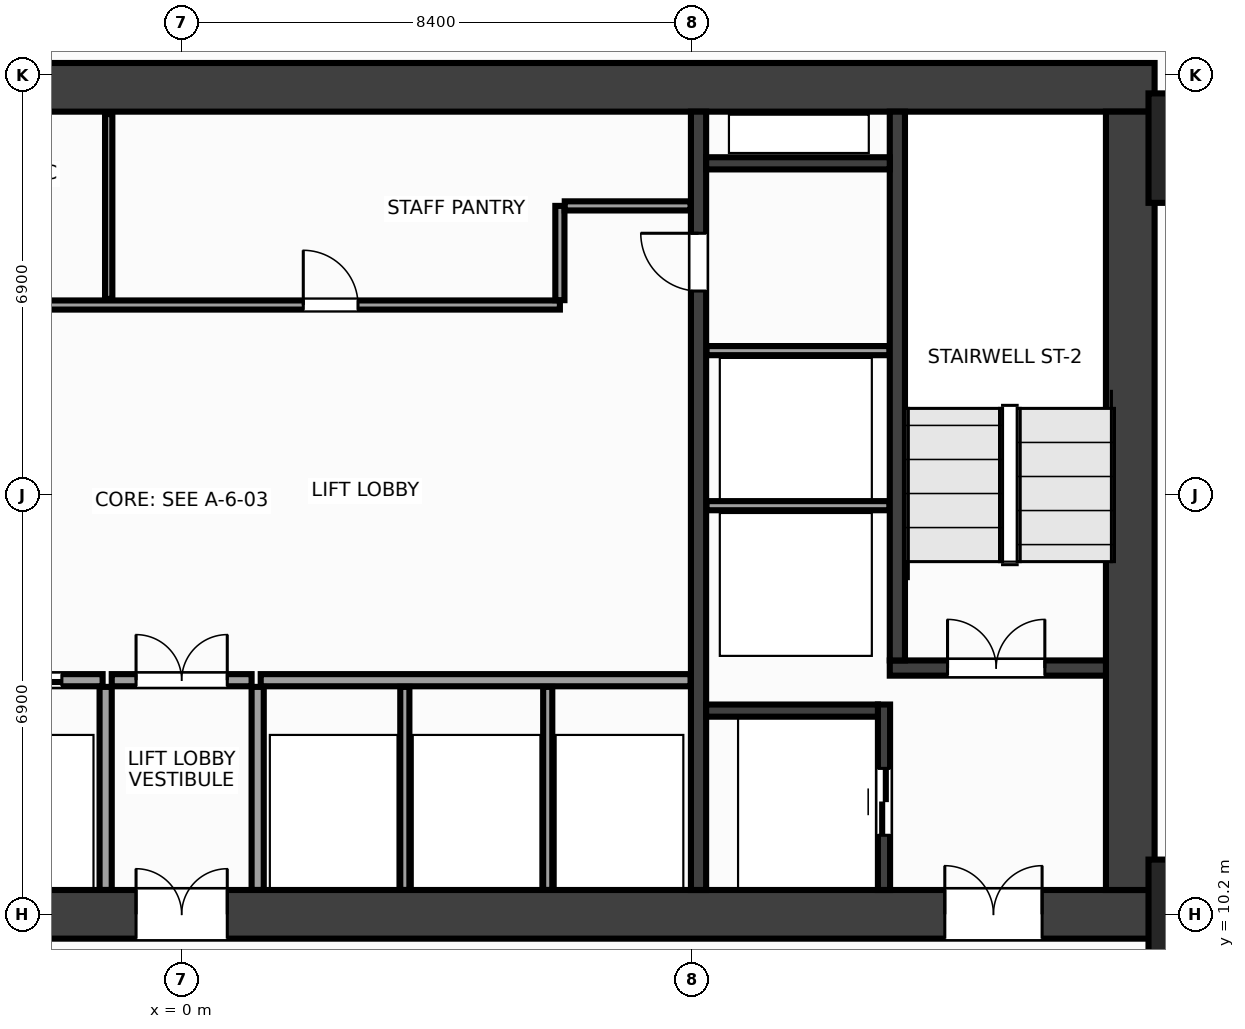
"""IFC4 building model, lengths in metres.
Left out: names, types, materials, properties, quantities, classifications, styles, units other than length and angle.
Written with IfcOpenShell. Run it as: python <this file> out.ifc"""

import sys

from ifc_helpers import new_model, si_unit, direction, frame, frame_2d, origin, origin_2d, place, context, subcontext, project, spatial, rectangle, extrude, source, transform, mapped, element, fill, save


model = new_model("IFC4")
c1 = context("Model", 3, precision=1e-05, world=origin(), true_north=direction((0.0, 1.0)))
c2 = subcontext(c1, "Body", "Model", "MODEL_VIEW")
j1 = project(units=[si_unit("LENGTHUNIT", "METRE"), si_unit("PLANEANGLEUNIT", "RADIAN")], contexts=[c1])
p1 = place(None, origin())
s1 = spatial("IfcSite", under=j1, at=p1, CompositionType="ELEMENT")
p2 = place(p1, origin())
s2 = spatial("IfcBuilding", under=s1, at=p2, CompositionType="ELEMENT")
p3 = place(p2, frame((0.0, 0.0, 23.6)))
s3 = spatial("IfcBuildingStorey", under=s2, at=p3, CompositionType="ELEMENT", Elevation=23.6)
m1 = source(origin(), c2, "Body", "SweptSolid", [
    extrude(rectangle(XDim=32.0, YDim=0.8, at=frame_2d((16.0, 0.0))), origin(), (0.0, 0.0, 1.0), 3.6),
])
p4 = place(p3, frame((-16.0, 23.8, 0.0), z_axis=(0.0, 0.0, 1.0), x_axis=(1.0, 0.0, 0.0)))
e1 = element("IfcWall", 1, at=p4, inside=s3, PredefinedType="SHEAR", context=c2, shape_type="MappedRepresentation", body=[
    mapped(m1, transform((0.0, 0.0, 0.0), x_axis=(1.0, 0.0, 0.0), y_axis=(0.0, 1.0, 0.0), z_axis=(0.0, 0.0, 1.0), scale=1.0)),
])
p5 = place(p3, frame((-16.0, 10.2, 0.0), z_axis=(0.0, 0.0, 1.0), x_axis=(1.0, 0.0, 0.0)))
e2 = element("IfcWall", 2, at=p5, inside=s3, PredefinedType="SHEAR", context=c2, shape_type="MappedRepresentation", body=[
    mapped(m1, transform((0.0, 0.0, 0.0), x_axis=(1.0, 0.0, 0.0), y_axis=(0.0, 1.0, 0.0), z_axis=(0.0, 0.0, 1.0), scale=1.0)),
])
p6 = place(p5, frame((1.85, 0.0, 0.0)))
e3 = element("IfcOpeningElement", 3, at=p6, cuts=e2, PredefinedType="OPENING", context=c2, shape_type="SweptSolid", body=[
    extrude(rectangle(XDim=1.6, YDim=2.15, at=frame_2d((0.8, 1.075))), frame((0.0, 0.412, 0.0), z_axis=(0.0, -1.0, 0.0), x_axis=(1.0, 0.0, 0.0)), (0.0, 0.0, 1.0), 0.824),
])
p7 = place(p5, frame((28.55, 0.0, 0.0)))
e4 = element("IfcOpeningElement", 4, at=p7, cuts=e2, PredefinedType="OPENING", context=c2, shape_type="SweptSolid", body=[
    extrude(rectangle(XDim=1.6, YDim=2.15, at=frame_2d((0.8, 1.075))), frame((0.0, 0.412, 0.0), z_axis=(0.0, -1.0, 0.0), x_axis=(1.0, 0.0, 0.0)), (0.0, 0.0, 1.0), 0.824),
])
p8 = place(p5, frame((15.25, 0.0, 0.0)))
e5 = element("IfcOpeningElement", 5, at=p8, cuts=e2, PredefinedType="OPENING", context=c2, shape_type="SweptSolid", body=[
    extrude(rectangle(XDim=1.5, YDim=2.2, at=frame_2d((0.75, 1.1))), frame((0.0, 0.412, 0.0), z_axis=(0.0, -1.0, 0.0), x_axis=(1.0, 0.0, 0.0)), (0.0, 0.0, 1.0), 0.824),
])
m2 = source(origin(), c2, "Body", "SweptSolid", [
    extrude(rectangle(XDim=12.8, YDim=0.8, at=frame_2d((6.4, 0.0))), origin(), (0.0, 0.0, 1.0), 3.6),
])
p9 = place(p3, frame((15.6, 10.6, 0.0), z_axis=(0.0, 0.0, 1.0), x_axis=(0.0, 1.0, 0.0)))
e6 = element("IfcWall", 6, at=p9, inside=s3, PredefinedType="SHEAR", context=c2, shape_type="MappedRepresentation", body=[
    mapped(m2, transform((0.0, 0.0, 0.0), x_axis=(1.0, 0.0, 0.0), y_axis=(0.0, 1.0, 0.0), z_axis=(0.0, 0.0, 1.0), scale=1.0)),
])
m3 = source(origin(), c2, "Body", "SweptSolid", [
    extrude(rectangle(XDim=12.8, YDim=0.25, at=frame_2d((6.4, 0.0))), origin(), (0.0, 0.0, 1.0), 3.6),
])
p10 = place(p3, frame((8.5, 10.6, 0.0), z_axis=(0.0, 0.0, 1.0), x_axis=(0.0, 1.0, 0.0)))
e7 = element("IfcWall", 7, at=p10, inside=s3, PredefinedType="SHEAR", context=c2, shape_type="MappedRepresentation", body=[
    mapped(m3, transform((0.0, 0.0, 0.0), x_axis=(1.0, 0.0, 0.0), y_axis=(0.0, 1.0, 0.0), z_axis=(0.0, 0.0, 1.0), scale=1.0)),
])
p11 = place(p10, frame((9.85, 0.0, 0.0)))
e8 = element("IfcOpeningElement", 8, at=p11, cuts=e7, PredefinedType="OPENING", context=c2, shape_type="SweptSolid", body=[
    extrude(rectangle(XDim=0.95, YDim=2.15, at=frame_2d((0.475, 1.075))), frame((0.0, 0.137, 0.0), z_axis=(0.0, -1.0, 0.0), x_axis=(1.0, 0.0, 0.0)), (0.0, 0.0, 1.0), 0.274),
])
m4 = source(origin(), c2, "Body", "SweptSolid", [
    extrude(rectangle(XDim=3.555, YDim=0.25, at=frame_2d((1.777, 0.0))), origin(), (0.0, 0.0, 1.0), 3.6),
])
p12 = place(p3, frame((11.645, 14.25, 0.0), z_axis=(0.0, 0.0, 1.0), x_axis=(1.0, 0.0, 0.0)))
e9 = element("IfcWall", 9, at=p12, inside=s3, PredefinedType="SHEAR", context=c2, shape_type="MappedRepresentation", body=[
    mapped(m4, transform((0.0, 0.0, 0.0), x_axis=(1.0, 0.0, 0.0), y_axis=(0.0, 1.0, 0.0), z_axis=(0.0, 0.0, 1.0), scale=1.0)),
])
p13 = place(p12, frame((0.95, 0.0, 0.0)))
e10 = element("IfcOpeningElement", 10, at=p13, cuts=e9, PredefinedType="OPENING", context=c2, shape_type="SweptSolid", body=[
    extrude(rectangle(XDim=1.6, YDim=2.15, at=frame_2d((0.8, 1.075))), frame((0.0, 0.137, 0.0), z_axis=(0.0, -1.0, 0.0), x_axis=(1.0, 0.0, 0.0)), (0.0, 0.0, 1.0), 0.274),
])
m5 = source(origin(), c2, "Body", "SweptSolid", [
    extrude(rectangle(XDim=9.025, YDim=0.25, at=frame_2d((4.512, 0.0))), origin(), (0.0, 0.0, 1.0), 3.6),
])
p14 = place(p3, frame((11.77, 14.375, 0.0), z_axis=(0.0, 0.0, 1.0), x_axis=(0.0, 1.0, 0.0)))
e11 = element("IfcWall", 11, at=p14, inside=s3, PredefinedType="SHEAR", context=c2, shape_type="MappedRepresentation", body=[
    mapped(m5, transform((0.0, 0.0, 0.0), x_axis=(1.0, 0.0, 0.0), y_axis=(0.0, 1.0, 0.0), z_axis=(0.0, 0.0, 1.0), scale=1.0)),
])
m6 = source(origin(), c2, "Body", "SweptSolid", [
    extrude(rectangle(XDim=3.05, YDim=0.2, at=frame_2d((1.525, 0.0))), origin(), (0.0, 0.0, 1.0), 3.6),
])
p15 = place(p3, frame((11.55, 10.6, 0.0), z_axis=(0.0, 0.0, 1.0), x_axis=(0.0, 1.0, 0.0)))
e12 = element("IfcWall", 12, at=p15, inside=s3, PredefinedType="SHEAR", context=c2, shape_type="MappedRepresentation", body=[
    mapped(m6, transform((0.0, 0.0, 0.0), x_axis=(1.0, 0.0, 0.0), y_axis=(0.0, 1.0, 0.0), z_axis=(0.0, 0.0, 1.0), scale=1.0)),
])
p16 = place(p15, frame((0.9, 0.0, 0.0)))
e13 = element("IfcOpeningElement", 13, at=p16, cuts=e12, PredefinedType="OPENING", context=c2, shape_type="SweptSolid", body=[
    extrude(rectangle(XDim=1.1, YDim=2.15, at=frame_2d((0.55, 1.075))), frame((0.0, 0.112, 0.0), z_axis=(0.0, -1.0, 0.0), x_axis=(1.0, 0.0, 0.0)), (0.0, 0.0, 1.0), 0.224),
])
m7 = source(origin(), c2, "Body", "SweptSolid", [
    extrude(rectangle(XDim=2.825, YDim=0.2, at=frame_2d((1.413, 0.0))), origin(), (0.0, 0.0, 1.0), 3.6),
])
p17 = place(p3, frame((8.625, 13.55, 0.0), z_axis=(0.0, 0.0, 1.0), x_axis=(1.0, 0.0, 0.0)))
e14 = element("IfcWall", 14, at=p17, inside=s3, PredefinedType="SHEAR", context=c2, shape_type="MappedRepresentation", body=[
    mapped(m7, transform((0.0, 0.0, 0.0), x_axis=(1.0, 0.0, 0.0), y_axis=(0.0, 1.0, 0.0), z_axis=(0.0, 0.0, 1.0), scale=1.0)),
])
m8 = source(origin(), c2, "Body", "SweptSolid", [
    extrude(rectangle(XDim=3.02, YDim=0.2, at=frame_2d((1.51, 0.0))), origin(), (0.0, 0.0, 1.0), 3.6),
])
p18 = place(p3, frame((8.625, 22.55, 0.0), z_axis=(0.0, 0.0, 1.0), x_axis=(1.0, 0.0, 0.0)))
e15 = element("IfcWall", 15, at=p18, inside=s3, PredefinedType="SHEAR", context=c2, shape_type="MappedRepresentation", body=[
    mapped(m8, transform((0.0, 0.0, 0.0), x_axis=(1.0, 0.0, 0.0), y_axis=(0.0, 1.0, 0.0), z_axis=(0.0, 0.0, 1.0), scale=1.0)),
])
m9 = source(origin(), c2, "Body", "SweptSolid", [
    extrude(rectangle(XDim=1.8, YDim=1.8, at=origin_2d()), origin(), (0.0, 0.0, 1.0), 3.6),
])
for number, where, z_axis, x_axis in (
    (16, (16.8, 10.2, 0.0), (0.0, 0.0, 1.0), (1.0, 0.0, 0.0)),
    (17, (16.8, 22.8, 0.0), (0.0, 0.0, 1.0), (1.0, 0.0, 0.0)),
):
    element("IfcColumn", number, at=place(p3, frame(where, z_axis=z_axis, x_axis=x_axis)), inside=s3, PredefinedType="COLUMN", context=c2, shape_type="MappedRepresentation", body=[
        mapped(m9, transform((0.0, 0.0, 0.0), x_axis=(1.0, 0.0, 0.0), y_axis=(0.0, 1.0, 0.0), z_axis=(0.0, 0.0, 1.0), scale=1.0)),
    ])
m10 = source(origin(), c2, "Body", "SweptSolid", [
    extrude(rectangle(XDim=3.01, YDim=0.15, at=frame_2d((1.505, 0.0))), origin(), (0.0, 0.0, 1.0), 3.36),
])
for number, where, z_axis, x_axis in (
    (18, (8.63, 16.92, 0.0), (0.0, 0.0, 1.0), (1.0, 0.0, 0.0)),
    (19, (8.63, 19.47, 0.0), (0.0, 0.0, 1.0), (1.0, 0.0, 0.0)),
):
    element("IfcWall", number, at=place(p3, frame(where, z_axis=z_axis, x_axis=x_axis)), inside=s3, PredefinedType="PARTITIONING", context=c2, shape_type="MappedRepresentation", body=[
        mapped(m10, transform((0.0, 0.0, 0.0), x_axis=(1.0, 0.0, 0.0), y_axis=(0.0, 1.0, 0.0), z_axis=(0.0, 0.0, 1.0), scale=1.0)),
    ])
m11 = source(origin(), c2, "Body", "SweptSolid", [
    extrude(rectangle(XDim=7.07, YDim=0.2, at=frame_2d((3.535, 0.0))), origin(), (0.0, 0.0, 1.0), 3.36),
])
p19 = place(p3, frame((-8.37, 14.05, 0.0), z_axis=(0.0, 0.0, 1.0), x_axis=(1.0, 0.0, 0.0)))
e20 = element("IfcWall", 20, at=p19, inside=s3, PredefinedType="PARTITIONING", context=c2, shape_type="MappedRepresentation", body=[
    mapped(m11, transform((0.0, 0.0, 0.0), x_axis=(1.0, 0.0, 0.0), y_axis=(0.0, 1.0, 0.0), z_axis=(0.0, 0.0, 1.0), scale=1.0)),
])
p20 = place(p19, frame((0.6, 0.0, 0.0)))
e21 = element("IfcOpeningElement", 21, at=p20, cuts=e20, PredefinedType="OPENING", context=c2, shape_type="SweptSolid", body=[
    extrude(rectangle(XDim=1.1, YDim=2.15, at=frame_2d((0.55, 1.075))), frame((0.0, 0.112, 0.0), z_axis=(0.0, -1.0, 0.0), x_axis=(1.0, 0.0, 0.0)), (0.0, 0.0, 1.0), 0.224),
])
p21 = place(p19, frame((2.95, 0.0, 0.0)))
e22 = element("IfcOpeningElement", 22, at=p21, cuts=e20, PredefinedType="OPENING", context=c2, shape_type="SweptSolid", body=[
    extrude(rectangle(XDim=1.1, YDim=2.15, at=frame_2d((0.55, 1.075))), frame((0.0, 0.112, 0.0), z_axis=(0.0, -1.0, 0.0), x_axis=(1.0, 0.0, 0.0)), (0.0, 0.0, 1.0), 0.224),
])
p22 = place(p19, frame((5.3, 0.0, 0.0)))
e23 = element("IfcOpeningElement", 23, at=p22, cuts=e20, PredefinedType="OPENING", context=c2, shape_type="SweptSolid", body=[
    extrude(rectangle(XDim=1.1, YDim=2.15, at=frame_2d((0.55, 1.075))), frame((0.0, 0.112, 0.0), z_axis=(0.0, -1.0, 0.0), x_axis=(1.0, 0.0, 0.0)), (0.0, 0.0, 1.0), 0.224),
])
p23 = place(p3, frame((1.3, 14.05, 0.0), z_axis=(0.0, 0.0, 1.0), x_axis=(1.0, 0.0, 0.0)))
e24 = element("IfcWall", 24, at=p23, inside=s3, PredefinedType="PARTITIONING", context=c2, shape_type="MappedRepresentation", body=[
    mapped(m11, transform((0.0, 0.0, 0.0), x_axis=(1.0, 0.0, 0.0), y_axis=(0.0, 1.0, 0.0), z_axis=(0.0, 0.0, 1.0), scale=1.0)),
])
m12 = source(origin(), c2, "Body", "SweptSolid", [
    extrude(rectangle(XDim=3.34, YDim=0.2, at=frame_2d((1.67, 0.0))), origin(), (0.0, 0.0, 1.0), 3.36),
])
for number, where, z_axis, x_axis in (
    (25, (-1.25, 10.6, 0.0), (0.0, 0.0, 1.0), (0.0, 1.0, 0.0)),
    (26, (1.25, 10.6, 0.0), (0.0, 0.0, 1.0), (0.0, 1.0, 0.0)),
):
    element("IfcWall", number, at=place(p3, frame(where, z_axis=z_axis, x_axis=x_axis)), inside=s3, PredefinedType="PARTITIONING", context=c2, shape_type="MappedRepresentation", body=[
        mapped(m12, transform((0.0, 0.0, 0.0), x_axis=(1.0, 0.0, 0.0), y_axis=(0.0, 1.0, 0.0), z_axis=(0.0, 0.0, 1.0), scale=1.0)),
    ])
m13 = source(origin(), c2, "Body", "SweptSolid", [
    extrude(rectangle(XDim=2.3, YDim=0.2, at=frame_2d((1.15, 0.0))), origin(), (0.0, 0.0, 1.0), 3.36),
])
p24 = place(p3, frame((-1.15, 14.05, 0.0), z_axis=(0.0, 0.0, 1.0), x_axis=(1.0, 0.0, 0.0)))
e27 = element("IfcWall", 27, at=p24, inside=s3, PredefinedType="PARTITIONING", context=c2, shape_type="MappedRepresentation", body=[
    mapped(m13, transform((0.0, 0.0, 0.0), x_axis=(1.0, 0.0, 0.0), y_axis=(0.0, 1.0, 0.0), z_axis=(0.0, 0.0, 1.0), scale=1.0)),
])
p25 = place(p24, frame((0.4, 0.0, 0.0)))
e28 = element("IfcOpeningElement", 28, at=p25, cuts=e27, PredefinedType="OPENING", context=c2, shape_type="SweptSolid", body=[
    extrude(rectangle(XDim=1.5, YDim=2.2, at=frame_2d((0.75, 1.1))), frame((0.0, 0.112, 0.0), z_axis=(0.0, -1.0, 0.0), x_axis=(1.0, 0.0, 0.0)), (0.0, 0.0, 1.0), 0.224),
])
m14 = source(origin(), c2, "Body", "SweptSolid", [
    extrude(rectangle(XDim=14.59, YDim=0.15, at=frame_2d((7.295, 0.0))), origin(), (0.0, 0.0, 1.0), 3.36),
])
p26 = place(p3, frame((-8.37, 20.22, 0.0), z_axis=(0.0, 0.0, 1.0), x_axis=(1.0, 0.0, 0.0)))
e29 = element("IfcWall", 29, at=p26, inside=s3, PredefinedType="PARTITIONING", context=c2, shape_type="MappedRepresentation", body=[
    mapped(m14, transform((0.0, 0.0, 0.0), x_axis=(1.0, 0.0, 0.0), y_axis=(0.0, 1.0, 0.0), z_axis=(0.0, 0.0, 1.0), scale=1.0)),
])
p27 = place(p26, frame((1.36, 0.0, 0.0)))
e30 = element("IfcOpeningElement", 30, at=p27, cuts=e29, PredefinedType="OPENING", context=c2, shape_type="SweptSolid", body=[
    extrude(rectangle(XDim=0.9, YDim=2.15, at=frame_2d((0.45, 1.075))), frame((0.0, 0.087, 0.0), z_axis=(0.0, -1.0, 0.0), x_axis=(1.0, 0.0, 0.0)), (0.0, 0.0, 1.0), 0.174),
])
p28 = place(p26, frame((4.92, 0.0, 0.0)))
e31 = element("IfcOpeningElement", 31, at=p28, cuts=e29, PredefinedType="OPENING", context=c2, shape_type="SweptSolid", body=[
    extrude(rectangle(XDim=0.9, YDim=2.15, at=frame_2d((0.45, 1.075))), frame((0.0, 0.087, 0.0), z_axis=(0.0, -1.0, 0.0), x_axis=(1.0, 0.0, 0.0)), (0.0, 0.0, 1.0), 0.174),
])
p29 = place(p26, frame((10.37, 0.0, 0.0)))
e32 = element("IfcOpeningElement", 32, at=p29, cuts=e29, PredefinedType="OPENING", context=c2, shape_type="SweptSolid", body=[
    extrude(rectangle(XDim=0.9, YDim=2.15, at=frame_2d((0.45, 1.075))), frame((0.0, 0.087, 0.0), z_axis=(0.0, -1.0, 0.0), x_axis=(1.0, 0.0, 0.0)), (0.0, 0.0, 1.0), 0.174),
])
m15 = source(origin(), c2, "Body", "SweptSolid", [
    extrude(rectangle(XDim=1.55, YDim=0.15, at=frame_2d((0.775, 0.0))), origin(), (0.0, 0.0, 1.0), 3.36),
])
p30 = place(p3, frame((6.22, 20.3, 0.0), z_axis=(0.0, 0.0, 1.0), x_axis=(0.0, 1.0, 0.0)))
e33 = element("IfcWall", 33, at=p30, inside=s3, PredefinedType="PARTITIONING", context=c2, shape_type="MappedRepresentation", body=[
    mapped(m15, transform((0.0, 0.0, 0.0), x_axis=(1.0, 0.0, 0.0), y_axis=(0.0, 1.0, 0.0), z_axis=(0.0, 0.0, 1.0), scale=1.0)),
])
m16 = source(origin(), c2, "Body", "SweptSolid", [
    extrude(rectangle(XDim=2.07, YDim=0.15, at=frame_2d((1.035, 0.0))), origin(), (0.0, 0.0, 1.0), 3.36),
])
p31 = place(p3, frame((6.3, 21.85, 0.0), z_axis=(0.0, 0.0, 1.0), x_axis=(1.0, 0.0, 0.0)))
e34 = element("IfcWall", 34, at=p31, inside=s3, PredefinedType="PARTITIONING", context=c2, shape_type="MappedRepresentation", body=[
    mapped(m16, transform((0.0, 0.0, 0.0), x_axis=(1.0, 0.0, 0.0), y_axis=(0.0, 1.0, 0.0), z_axis=(0.0, 0.0, 1.0), scale=1.0)),
])
m17 = source(origin(), c2, "Body", "SweptSolid", [
    extrude(rectangle(XDim=3.34, YDim=0.15, at=frame_2d((1.67, 0.0))), origin(), (0.0, 0.0, 1.0), 3.36),
])
for number, where, z_axis, x_axis in (
    (35, (3.67, 10.6, 0.0), (0.0, 0.0, 1.0), (0.0, 1.0, 0.0)),
    (36, (6.02, 10.6, 0.0), (0.0, 0.0, 1.0), (0.0, 1.0, 0.0)),
):
    element("IfcWall", number, at=place(p3, frame(where, z_axis=z_axis, x_axis=x_axis)), inside=s3, PredefinedType="PARTITIONING", context=c2, shape_type="MappedRepresentation", body=[
        mapped(m17, transform((0.0, 0.0, 0.0), x_axis=(1.0, 0.0, 0.0), y_axis=(0.0, 1.0, 0.0), z_axis=(0.0, 0.0, 1.0), scale=1.0)),
    ])
m18 = source(origin(), c2, "Body", "SweptSolid", [
    extrude(rectangle(XDim=3.04, YDim=0.12, at=frame_2d((1.52, 0.0))), origin(), (0.0, 0.0, 1.0), 3.36),
])
p32 = place(p3, frame((-1.2, 20.32, 0.0), z_axis=(0.0, 0.0, 1.0), x_axis=(0.0, 1.0, 0.0)))
e37 = element("IfcWall", 37, at=p32, inside=s3, PredefinedType="PARTITIONING", context=c2, shape_type="MappedRepresentation", body=[
    mapped(m18, transform((0.0, 0.0, 0.0), x_axis=(1.0, 0.0, 0.0), y_axis=(0.0, 1.0, 0.0), z_axis=(0.0, 0.0, 1.0), scale=1.0)),
])
m19 = source(origin(), c2, "Body", "SweptSolid", [
    extrude(rectangle(XDim=1.6, YDim=2.15, at=frame_2d((0.8, 1.075))), frame((0.0, 0.025, 0.0), z_axis=(0.0, -1.0, 0.0), x_axis=(1.0, 0.0, 0.0)), (0.0, 0.0, 1.0), 0.05),
])
p33 = place(p13, origin())
e38 = element("IfcDoor", 38, at=p33, inside=s3, OperationType="DOUBLE_DOOR_SINGLE_SWING", PredefinedType="DOOR", context=c2, shape_type="MappedRepresentation", body=[
    mapped(m19, transform((0.0, 0.0, 0.0), x_axis=(1.0, 0.0, 0.0), y_axis=(0.0, 1.0, 0.0), z_axis=(0.0, 0.0, 1.0), scale=1.0)),
])
fill(e10, e38)
p34 = place(p7, origin())
e39 = element("IfcDoor", 39, at=p34, inside=s3, OperationType="DOUBLE_DOOR_SINGLE_SWING", PredefinedType="DOOR", context=c2, shape_type="MappedRepresentation", body=[
    mapped(m19, transform((0.0, 0.0, 0.0), x_axis=(1.0, 0.0, 0.0), y_axis=(0.0, 1.0, 0.0), z_axis=(0.0, 0.0, 1.0), scale=1.0)),
])
fill(e4, e39)
m20 = source(origin(), c2, "Body", "SweptSolid", [
    extrude(rectangle(XDim=1.1, YDim=2.15, at=frame_2d((0.55, 1.075))), frame((0.0, 0.025, 0.0), z_axis=(0.0, -1.0, 0.0), x_axis=(1.0, 0.0, 0.0)), (0.0, 0.0, 1.0), 0.05),
])
p35 = place(p16, origin())
e40 = element("IfcDoor", 40, at=p35, inside=s3, OperationType="DOUBLE_DOOR_SLIDING", PredefinedType="DOOR", context=c2, shape_type="MappedRepresentation", body=[
    mapped(m20, transform((0.0, 0.0, 0.0), x_axis=(1.0, 0.0, 0.0), y_axis=(0.0, 1.0, 0.0), z_axis=(0.0, 0.0, 1.0), scale=1.0)),
])
fill(e13, e40)
m21 = source(origin(), c2, "Body", "SweptSolid", [
    extrude(rectangle(XDim=0.95, YDim=2.15, at=frame_2d((0.475, 1.075))), frame((0.0, 0.025, 0.0), z_axis=(0.0, -1.0, 0.0), x_axis=(1.0, 0.0, 0.0)), (0.0, 0.0, 1.0), 0.05),
])
p36 = place(p11, origin())
e41 = element("IfcDoor", 41, at=p36, inside=s3, OperationType="SINGLE_SWING_RIGHT", PredefinedType="DOOR", context=c2, shape_type="MappedRepresentation", body=[
    mapped(m21, transform((0.0, 0.0, 0.0), x_axis=(1.0, 0.0, 0.0), y_axis=(0.0, 1.0, 0.0), z_axis=(0.0, 0.0, 1.0), scale=1.0)),
])
fill(e8, e41)
p37 = place(p22, origin())
e42 = element("IfcDoor", 42, at=p37, inside=s3, OperationType="DOUBLE_DOOR_SLIDING", PredefinedType="DOOR", context=c2, shape_type="MappedRepresentation", body=[
    mapped(m20, transform((0.0, 0.0, 0.0), x_axis=(1.0, 0.0, 0.0), y_axis=(0.0, 1.0, 0.0), z_axis=(0.0, 0.0, 1.0), scale=1.0)),
])
fill(e23, e42)
m22 = source(origin(), c2, "Body", "SweptSolid", [
    extrude(rectangle(XDim=1.5, YDim=2.2, at=frame_2d((0.75, 1.1))), frame((0.0, 0.025, 0.0), z_axis=(0.0, -1.0, 0.0), x_axis=(1.0, 0.0, 0.0)), (0.0, 0.0, 1.0), 0.05),
])
p38 = place(p25, origin())
e43 = element("IfcDoor", 43, at=p38, inside=s3, OperationType="DOUBLE_DOOR_SINGLE_SWING", PredefinedType="DOOR", context=c2, shape_type="MappedRepresentation", body=[
    mapped(m22, transform((0.0, 0.0, 0.0), x_axis=(1.0, 0.0, 0.0), y_axis=(0.0, 1.0, 0.0), z_axis=(0.0, 0.0, 1.0), scale=1.0)),
])
fill(e28, e43)
p39 = place(p8, origin())
e44 = element("IfcDoor", 44, at=p39, inside=s3, OperationType="DOUBLE_DOOR_SINGLE_SWING", PredefinedType="DOOR", context=c2, shape_type="MappedRepresentation", body=[
    mapped(m22, transform((0.0, 0.0, 0.0), x_axis=(1.0, 0.0, 0.0), y_axis=(0.0, 1.0, 0.0), z_axis=(0.0, 0.0, 1.0), scale=1.0)),
])
fill(e5, e44)
m23 = source(origin(), c2, "Body", "SweptSolid", [
    extrude(rectangle(XDim=0.9, YDim=2.15, at=frame_2d((0.45, 1.075))), frame((0.0, 0.025, 0.0), z_axis=(0.0, -1.0, 0.0), x_axis=(1.0, 0.0, 0.0)), (0.0, 0.0, 1.0), 0.05),
])
p40 = place(p29, origin())
e45 = element("IfcDoor", 45, at=p40, inside=s3, OperationType="SINGLE_SWING_LEFT", PredefinedType="DOOR", context=c2, shape_type="MappedRepresentation", body=[
    mapped(m23, transform((0.0, 0.0, 0.0), x_axis=(1.0, 0.0, 0.0), y_axis=(0.0, 1.0, 0.0), z_axis=(0.0, 0.0, 1.0), scale=1.0)),
])
fill(e32, e45)
save(model, sys.argv[1])
